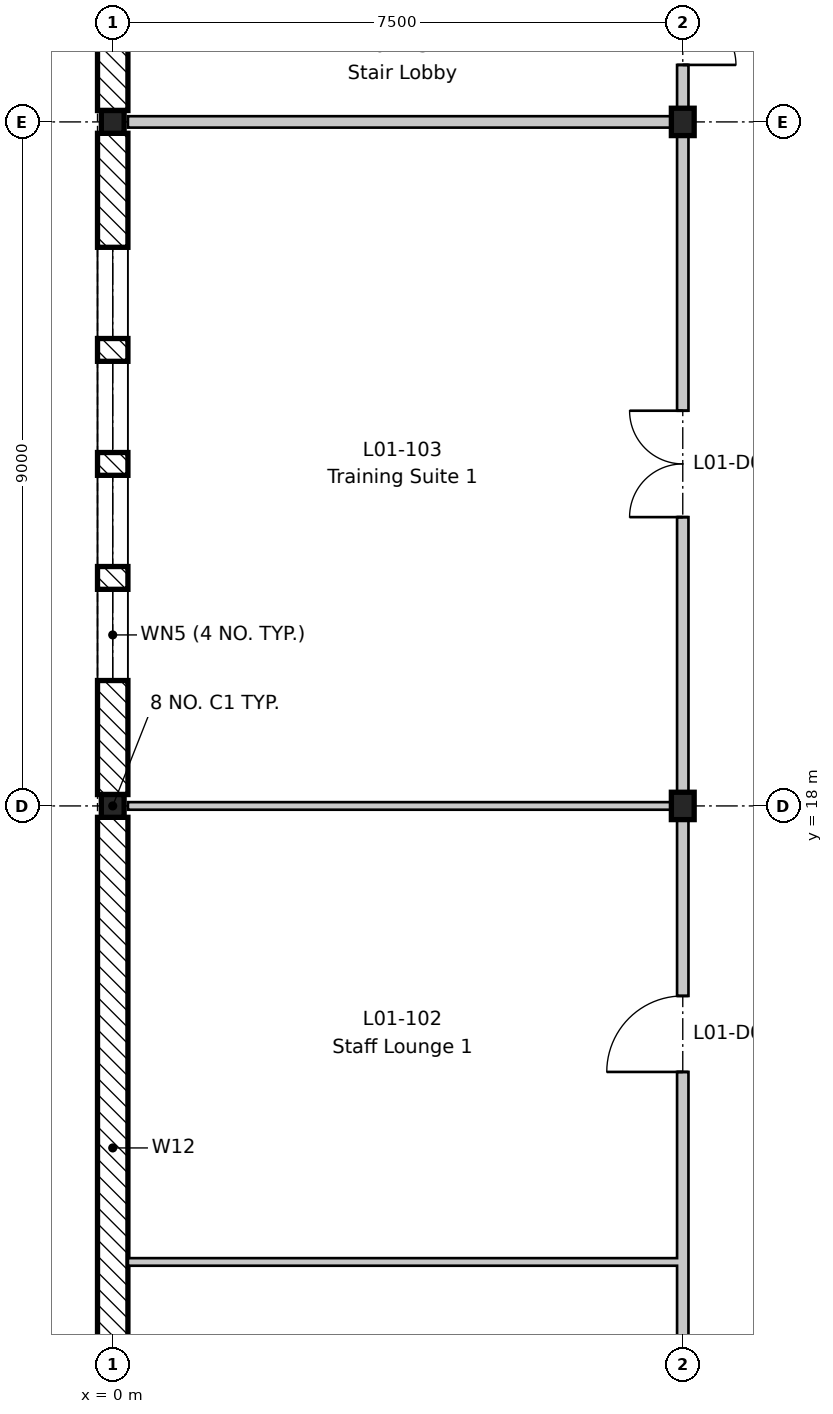
"""IFC4 building model, lengths in metres.
Left out: names, types, materials, properties, quantities, classifications, styles, units other than length and angle.
Written with IfcOpenShell. Run it as: python <this file> out.ifc"""

import sys

from ifc_helpers import new_model, si_unit, direction, frame, frame_2d, origin, origin_2d, place, context, subcontext, project, spatial, rectangle, i_section, extrude, element, fill, save


model = new_model("IFC4")
c1 = context("Model", 3, precision=1e-05, world=origin(), true_north=direction((0.0, 1.0)))
c2 = subcontext(c1, "Body", "Model", "MODEL_VIEW")
j1 = project(units=[si_unit("LENGTHUNIT", "METRE"), si_unit("PLANEANGLEUNIT", "RADIAN")], contexts=[c1])
p1 = place(None, origin())
s1 = spatial("IfcSite", under=j1, at=p1, CompositionType="ELEMENT")
p2 = place(p1, origin())
s2 = spatial("IfcBuilding", under=s1, at=p2, CompositionType="ELEMENT")
p3 = place(p2, frame((0.0, 0.0, 5.4)))
s3 = spatial("IfcBuildingStorey", under=s2, at=p3, CompositionType="ELEMENT", Elevation=5.4)
for number, where, z_axis, x_axis in (
    (1, (0.0, 18.0, -0.2), (0.0, 0.0, 1.0), (1.0, 0.0, 0.0)),
    (2, (0.0, 27.0, -0.2), (0.0, 0.0, 1.0), (1.0, 0.0, 0.0)),
):
    element("IfcColumn", number, at=place(p3, frame(where, z_axis=z_axis, x_axis=x_axis)), inside=s3, PredefinedType="COLUMN", context=c2, shape_type="SweptSolid", body=[
        extrude(i_section(OverallWidth=0.3, OverallDepth=0.3, WebThickness=0.011, FlangeThickness=0.019, FilletRadius=0.027, at=origin_2d()), origin(), (0.0, 0.0, 1.0), 4.5),
    ])
for number, where, z_axis, x_axis in (
    (3, (7.5, 18.0, -0.2), (0.0, 0.0, 1.0), (1.0, 0.0, 0.0)),
    (4, (7.5, 27.0, -0.2), (0.0, 0.0, 1.0), (1.0, 0.0, 0.0)),
):
    element("IfcColumn", number, at=place(p3, frame(where, z_axis=z_axis, x_axis=x_axis)), inside=s3, PredefinedType="COLUMN", context=c2, shape_type="SweptSolid", body=[
        extrude(i_section(OverallWidth=0.3, OverallDepth=0.36, WebThickness=0.012, FlangeThickness=0.022, FilletRadius=0.027, at=origin_2d()), origin(), (0.0, 0.0, 1.0), 4.5),
    ])
p4 = place(p3, frame((0.0, 9.15, 0.0), z_axis=(0.0, 0.0, 1.0), x_axis=(0.0, 1.0, 0.0)))
e5 = element("IfcWall", 5, at=p4, inside=s3, PredefinedType="STANDARD", context=c2, shape_type="SweptSolid", body=[
    extrude(rectangle(XDim=8.7, YDim=0.4, at=frame_2d((4.35, 0.0))), origin(), (0.0, 0.0, 1.0), 3.9),
])
p5 = place(p3, frame((0.0, 18.15, 0.0), z_axis=(0.0, 0.0, 1.0), x_axis=(0.0, 1.0, 0.0)))
e6 = element("IfcWall", 6, at=p5, inside=s3, PredefinedType="STANDARD", context=c2, shape_type="SweptSolid", body=[
    extrude(rectangle(XDim=8.7, YDim=0.4, at=frame_2d((4.35, 0.0))), origin(), (0.0, 0.0, 1.0), 3.9),
])
p6 = place(p5, frame((1.5, 0.0, 0.6)))
e7 = element("IfcOpeningElement", 7, at=p6, cuts=e6, PredefinedType="OPENING", context=c2, shape_type="SweptSolid", body=[
    extrude(rectangle(XDim=1.2, YDim=3.0, at=frame_2d((0.6, 1.5))), frame((0.0, 0.21, 0.0), z_axis=(0.0, -1.0, 0.0), x_axis=(1.0, 0.0, 0.0)), (0.0, 0.0, 1.0), 0.42),
])
p7 = place(p5, frame((3.0, 0.0, 0.6)))
e8 = element("IfcOpeningElement", 8, at=p7, cuts=e6, PredefinedType="OPENING", context=c2, shape_type="SweptSolid", body=[
    extrude(rectangle(XDim=1.2, YDim=3.0, at=frame_2d((0.6, 1.5))), frame((0.0, 0.21, 0.0), z_axis=(0.0, -1.0, 0.0), x_axis=(1.0, 0.0, 0.0)), (0.0, 0.0, 1.0), 0.42),
])
p8 = place(p5, frame((4.5, 0.0, 0.6)))
e9 = element("IfcOpeningElement", 9, at=p8, cuts=e6, PredefinedType="OPENING", context=c2, shape_type="SweptSolid", body=[
    extrude(rectangle(XDim=1.2, YDim=3.0, at=frame_2d((0.6, 1.5))), frame((0.0, 0.21, 0.0), z_axis=(0.0, -1.0, 0.0), x_axis=(1.0, 0.0, 0.0)), (0.0, 0.0, 1.0), 0.42),
])
p9 = place(p5, frame((6.0, 0.0, 0.6)))
e10 = element("IfcOpeningElement", 10, at=p9, cuts=e6, PredefinedType="OPENING", context=c2, shape_type="SweptSolid", body=[
    extrude(rectangle(XDim=1.2, YDim=3.0, at=frame_2d((0.6, 1.5))), frame((0.0, 0.21, 0.0), z_axis=(0.0, -1.0, 0.0), x_axis=(1.0, 0.0, 0.0)), (0.0, 0.0, 1.0), 0.42),
])
p10 = place(p3, frame((0.0, 27.15, 0.0), z_axis=(0.0, 0.0, 1.0), x_axis=(0.0, 1.0, 0.0)))
e11 = element("IfcWall", 11, at=p10, inside=s3, PredefinedType="STANDARD", context=c2, shape_type="SweptSolid", body=[
    extrude(rectangle(XDim=8.7, YDim=0.4, at=frame_2d((4.35, 0.0))), origin(), (0.0, 0.0, 1.0), 3.9),
])
p11 = place(p10, frame((3.075, 0.0, 0.9)))
e12 = element("IfcOpeningElement", 12, at=p11, cuts=e11, PredefinedType="OPENING", context=c2, shape_type="SweptSolid", body=[
    extrude(rectangle(XDim=1.05, YDim=2.7, at=frame_2d((0.525, 1.35))), frame((0.0, 0.21, 0.0), z_axis=(0.0, -1.0, 0.0), x_axis=(1.0, 0.0, 0.0)), (0.0, 0.0, 1.0), 0.42),
])
p12 = place(p10, frame((4.575, 0.0, 0.9)))
e13 = element("IfcOpeningElement", 13, at=p12, cuts=e11, PredefinedType="OPENING", context=c2, shape_type="SweptSolid", body=[
    extrude(rectangle(XDim=1.05, YDim=2.7, at=frame_2d((0.525, 1.35))), frame((0.0, 0.21, 0.0), z_axis=(0.0, -1.0, 0.0), x_axis=(1.0, 0.0, 0.0)), (0.0, 0.0, 1.0), 0.42),
])
p13 = place(p3, frame((0.2, 12.0, 0.0), z_axis=(0.0, 0.0, 1.0), x_axis=(1.0, 0.0, 0.0)))
e14 = element("IfcWall", 14, at=p13, inside=s3, PredefinedType="PARTITIONING", context=c2, shape_type="SweptSolid", body=[
    extrude(rectangle(XDim=7.225, YDim=0.1, at=frame_2d((3.613, 0.0))), origin(), (0.0, 0.0, 1.0), 4.3),
])
p14 = place(p3, frame((0.2, 18.0, 0.0), z_axis=(0.0, 0.0, 1.0), x_axis=(1.0, 0.0, 0.0)))
e15 = element("IfcWall", 15, at=p14, inside=s3, PredefinedType="PARTITIONING", context=c2, shape_type="SweptSolid", body=[
    extrude(rectangle(XDim=7.225, YDim=0.1, at=frame_2d((3.613, 0.0))), origin(), (0.0, 0.0, 1.0), 3.95),
])
p15 = place(p3, frame((0.2, 27.0, 0.0), z_axis=(0.0, 0.0, 1.0), x_axis=(1.0, 0.0, 0.0)))
e16 = element("IfcWall", 16, at=p15, inside=s3, PredefinedType="PARTITIONING", context=c2, shape_type="SweptSolid", body=[
    extrude(rectangle(XDim=7.225, YDim=0.15, at=frame_2d((3.613, 0.0))), origin(), (0.0, 0.0, 1.0), 3.95),
])
p16 = place(p3, frame((7.5, -8.8, 0.0), z_axis=(0.0, 0.0, 1.0), x_axis=(0.0, 1.0, 0.0)))
e17 = element("IfcWall", 17, at=p16, inside=s3, PredefinedType="PARTITIONING", context=c2, shape_type="SweptSolid", body=[
    extrude(rectangle(XDim=79.3, YDim=0.15, at=frame_2d((39.65, 0.0))), origin(), (0.0, 0.0, 1.0), 3.78),
])
p17 = place(p16, frame((18.8, 0.0, 0.0)))
e18 = element("IfcOpeningElement", 18, at=p17, cuts=e17, PredefinedType="OPENING", context=c2, shape_type="SweptSolid", body=[
    extrude(rectangle(XDim=1.0, YDim=2.1, at=frame_2d((0.5, 1.05))), frame((0.0, 0.085, 0.0), z_axis=(0.0, -1.0, 0.0), x_axis=(1.0, 0.0, 0.0)), (0.0, 0.0, 1.0), 0.17),
])
p18 = place(p16, frame((23.3, 0.0, 0.0)))
e19 = element("IfcOpeningElement", 19, at=p18, cuts=e17, PredefinedType="OPENING", context=c2, shape_type="SweptSolid", body=[
    extrude(rectangle(XDim=1.0, YDim=2.1, at=frame_2d((0.5, 1.05))), frame((0.0, 0.085, 0.0), z_axis=(0.0, -1.0, 0.0), x_axis=(1.0, 0.0, 0.0)), (0.0, 0.0, 1.0), 0.17),
])
p19 = place(p16, frame((30.6, 0.0, 0.0)))
e20 = element("IfcOpeningElement", 20, at=p19, cuts=e17, PredefinedType="OPENING", context=c2, shape_type="SweptSolid", body=[
    extrude(rectangle(XDim=1.4, YDim=2.1, at=frame_2d((0.7, 1.05))), frame((0.0, 0.085, 0.0), z_axis=(0.0, -1.0, 0.0), x_axis=(1.0, 0.0, 0.0)), (0.0, 0.0, 1.0), 0.17),
])
p20 = place(p16, frame((45.8, 0.0, 0.0)))
e21 = element("IfcOpeningElement", 21, at=p20, cuts=e17, PredefinedType="OPENING", context=c2, shape_type="SweptSolid", body=[
    extrude(rectangle(XDim=1.0, YDim=2.1, at=frame_2d((0.5, 1.05))), frame((0.0, 0.085, 0.0), z_axis=(0.0, -1.0, 0.0), x_axis=(1.0, 0.0, 0.0)), (0.0, 0.0, 1.0), 0.17),
])
p21 = place(p16, frame((48.8, 0.0, 0.0)))
e22 = element("IfcOpeningElement", 22, at=p21, cuts=e17, PredefinedType="OPENING", context=c2, shape_type="SweptSolid", body=[
    extrude(rectangle(XDim=1.0, YDim=2.1, at=frame_2d((0.5, 1.05))), frame((0.0, 0.085, 0.0), z_axis=(0.0, -1.0, 0.0), x_axis=(1.0, 0.0, 0.0)), (0.0, 0.0, 1.0), 0.17),
])
p22 = place(p16, frame((51.8, 0.0, 0.0)))
e23 = element("IfcOpeningElement", 23, at=p22, cuts=e17, PredefinedType="OPENING", context=c2, shape_type="SweptSolid", body=[
    extrude(rectangle(XDim=1.0, YDim=2.1, at=frame_2d((0.5, 1.05))), frame((0.0, 0.085, 0.0), z_axis=(0.0, -1.0, 0.0), x_axis=(1.0, 0.0, 0.0)), (0.0, 0.0, 1.0), 0.17),
])
p23 = place(p16, frame((54.8, 0.0, 0.0)))
e24 = element("IfcOpeningElement", 24, at=p23, cuts=e17, PredefinedType="OPENING", context=c2, shape_type="SweptSolid", body=[
    extrude(rectangle(XDim=1.0, YDim=2.1, at=frame_2d((0.5, 1.05))), frame((0.0, 0.085, 0.0), z_axis=(0.0, -1.0, 0.0), x_axis=(1.0, 0.0, 0.0)), (0.0, 0.0, 1.0), 0.17),
])
p24 = place(p16, frame((59.3, 0.0, 0.0)))
e25 = element("IfcOpeningElement", 25, at=p24, cuts=e17, PredefinedType="OPENING", context=c2, shape_type="SweptSolid", body=[
    extrude(rectangle(XDim=1.0, YDim=2.1, at=frame_2d((0.5, 1.05))), frame((0.0, 0.085, 0.0), z_axis=(0.0, -1.0, 0.0), x_axis=(1.0, 0.0, 0.0)), (0.0, 0.0, 1.0), 0.17),
])
p25 = place(p16, frame((12.6, 0.0, 0.0)))
e26 = element("IfcOpeningElement", 26, at=p25, cuts=e17, PredefinedType="OPENING", context=c2, shape_type="SweptSolid", body=[
    extrude(rectangle(XDim=1.4, YDim=2.1, at=frame_2d((0.7, 1.05))), frame((0.0, 0.085, 0.0), z_axis=(0.0, -1.0, 0.0), x_axis=(1.0, 0.0, 0.0)), (0.0, 0.0, 1.0), 0.17),
])
p26 = place(p16, frame((3.6, 0.0, 0.0)))
e27 = element("IfcOpeningElement", 27, at=p26, cuts=e17, PredefinedType="OPENING", context=c2, shape_type="SweptSolid", body=[
    extrude(rectangle(XDim=1.4, YDim=2.1, at=frame_2d((0.7, 1.05))), frame((0.0, 0.085, 0.0), z_axis=(0.0, -1.0, 0.0), x_axis=(1.0, 0.0, 0.0)), (0.0, 0.0, 1.0), 0.17),
])
p27 = place(p16, frame((63.55, 0.0, 0.0)))
e28 = element("IfcOpeningElement", 28, at=p27, cuts=e17, PredefinedType="OPENING", context=c2, shape_type="SweptSolid", body=[
    extrude(rectangle(XDim=1.4, YDim=2.1, at=frame_2d((0.7, 1.05))), frame((0.0, 0.085, 0.0), z_axis=(0.0, -1.0, 0.0), x_axis=(1.0, 0.0, 0.0)), (0.0, 0.0, 1.0), 0.17),
])
p28 = place(p16, frame((69.6, 0.0, 0.0)))
e29 = element("IfcOpeningElement", 29, at=p28, cuts=e17, PredefinedType="OPENING", context=c2, shape_type="SweptSolid", body=[
    extrude(rectangle(XDim=1.4, YDim=2.1, at=frame_2d((0.7, 1.05))), frame((0.0, 0.085, 0.0), z_axis=(0.0, -1.0, 0.0), x_axis=(1.0, 0.0, 0.0)), (0.0, 0.0, 1.0), 0.17),
])
p29 = place(p16, frame((42.85, 0.0, 0.0)))
e30 = element("IfcOpeningElement", 30, at=p29, cuts=e17, PredefinedType="OPENING", context=c2, shape_type="SweptSolid", body=[
    extrude(rectangle(XDim=1.0, YDim=2.1, at=frame_2d((0.5, 1.05))), frame((0.0, 0.085, 0.0), z_axis=(0.0, -1.0, 0.0), x_axis=(1.0, 0.0, 0.0)), (0.0, 0.0, 1.0), 0.17),
])
p30 = place(p16, frame((36.55, 0.0, 0.0)))
e31 = element("IfcOpeningElement", 31, at=p30, cuts=e17, PredefinedType="OPENING", context=c2, shape_type="SweptSolid", body=[
    extrude(rectangle(XDim=1.4, YDim=2.1, at=frame_2d((0.7, 1.05))), frame((0.0, 0.085, 0.0), z_axis=(0.0, -1.0, 0.0), x_axis=(1.0, 0.0, 0.0)), (0.0, 0.0, 1.0), 0.17),
])
p31 = place(p16, frame((72.8, 0.0, 0.0)))
e32 = element("IfcOpeningElement", 32, at=p31, cuts=e17, PredefinedType="OPENING", context=c2, shape_type="SweptSolid", body=[
    extrude(rectangle(XDim=1.0, YDim=2.1, at=frame_2d((0.5, 1.05))), frame((0.0, 0.085, 0.0), z_axis=(0.0, -1.0, 0.0), x_axis=(1.0, 0.0, 0.0)), (0.0, 0.0, 1.0), 0.17),
])
p32 = place(p6, origin())
e33 = element("IfcWindow", 33, at=p32, inside=s3, PartitioningType="SINGLE_PANEL", PredefinedType="WINDOW", context=c2, shape_type="SweptSolid", body=[
    extrude(rectangle(XDim=1.2, YDim=3.0, at=frame_2d((0.6, 1.5))), frame((0.0, 0.03, 0.0), z_axis=(0.0, -1.0, 0.0), x_axis=(1.0, 0.0, 0.0)), (0.0, 0.0, 1.0), 0.06),
])
fill(e7, e33)
p33 = place(p7, origin())
e34 = element("IfcWindow", 34, at=p33, inside=s3, PartitioningType="SINGLE_PANEL", PredefinedType="WINDOW", context=c2, shape_type="SweptSolid", body=[
    extrude(rectangle(XDim=1.2, YDim=3.0, at=frame_2d((0.6, 1.5))), frame((0.0, 0.03, 0.0), z_axis=(0.0, -1.0, 0.0), x_axis=(1.0, 0.0, 0.0)), (0.0, 0.0, 1.0), 0.06),
])
fill(e8, e34)
p34 = place(p8, origin())
e35 = element("IfcWindow", 35, at=p34, inside=s3, PartitioningType="SINGLE_PANEL", PredefinedType="WINDOW", context=c2, shape_type="SweptSolid", body=[
    extrude(rectangle(XDim=1.2, YDim=3.0, at=frame_2d((0.6, 1.5))), frame((0.0, 0.03, 0.0), z_axis=(0.0, -1.0, 0.0), x_axis=(1.0, 0.0, 0.0)), (0.0, 0.0, 1.0), 0.06),
])
fill(e9, e35)
p35 = place(p9, origin())
e36 = element("IfcWindow", 36, at=p35, inside=s3, PartitioningType="SINGLE_PANEL", PredefinedType="WINDOW", context=c2, shape_type="SweptSolid", body=[
    extrude(rectangle(XDim=1.2, YDim=3.0, at=frame_2d((0.6, 1.5))), frame((0.0, 0.03, 0.0), z_axis=(0.0, -1.0, 0.0), x_axis=(1.0, 0.0, 0.0)), (0.0, 0.0, 1.0), 0.06),
])
fill(e10, e36)
p36 = place(p18, origin())
e37 = element("IfcDoor", 37, at=p36, inside=s3, OperationType="SINGLE_SWING_LEFT", PredefinedType="DOOR", context=c2, shape_type="SweptSolid", body=[
    extrude(rectangle(XDim=1.0, YDim=2.1, at=frame_2d((0.5, 1.05))), frame((0.0, 0.025, 0.0), z_axis=(0.0, -1.0, 0.0), x_axis=(1.0, 0.0, 0.0)), (0.0, 0.0, 1.0), 0.05),
])
fill(e19, e37)
p37 = place(p19, origin())
e38 = element("IfcDoor", 38, at=p37, inside=s3, OperationType="DOUBLE_DOOR_SINGLE_SWING", PredefinedType="DOOR", context=c2, shape_type="SweptSolid", body=[
    extrude(rectangle(XDim=1.4, YDim=2.1, at=frame_2d((0.7, 1.05))), frame((0.0, 0.025, 0.0), z_axis=(0.0, -1.0, 0.0), x_axis=(1.0, 0.0, 0.0)), (0.0, 0.0, 1.0), 0.05),
])
fill(e20, e38)
p38 = place(p30, frame((1.4, 0.0, 0.0), z_axis=(0.0, 0.0, 1.0), x_axis=(-1.0, 0.0, 0.0)))
e39 = element("IfcDoor", 39, at=p38, inside=s3, OperationType="DOUBLE_DOOR_SINGLE_SWING", PredefinedType="DOOR", context=c2, shape_type="SweptSolid", body=[
    extrude(rectangle(XDim=1.4, YDim=2.1, at=frame_2d((0.7, 1.05))), frame((0.0, 0.025, 0.0), z_axis=(0.0, -1.0, 0.0), x_axis=(1.0, 0.0, 0.0)), (0.0, 0.0, 1.0), 0.05),
])
fill(e31, e39)
save(model, sys.argv[1])
